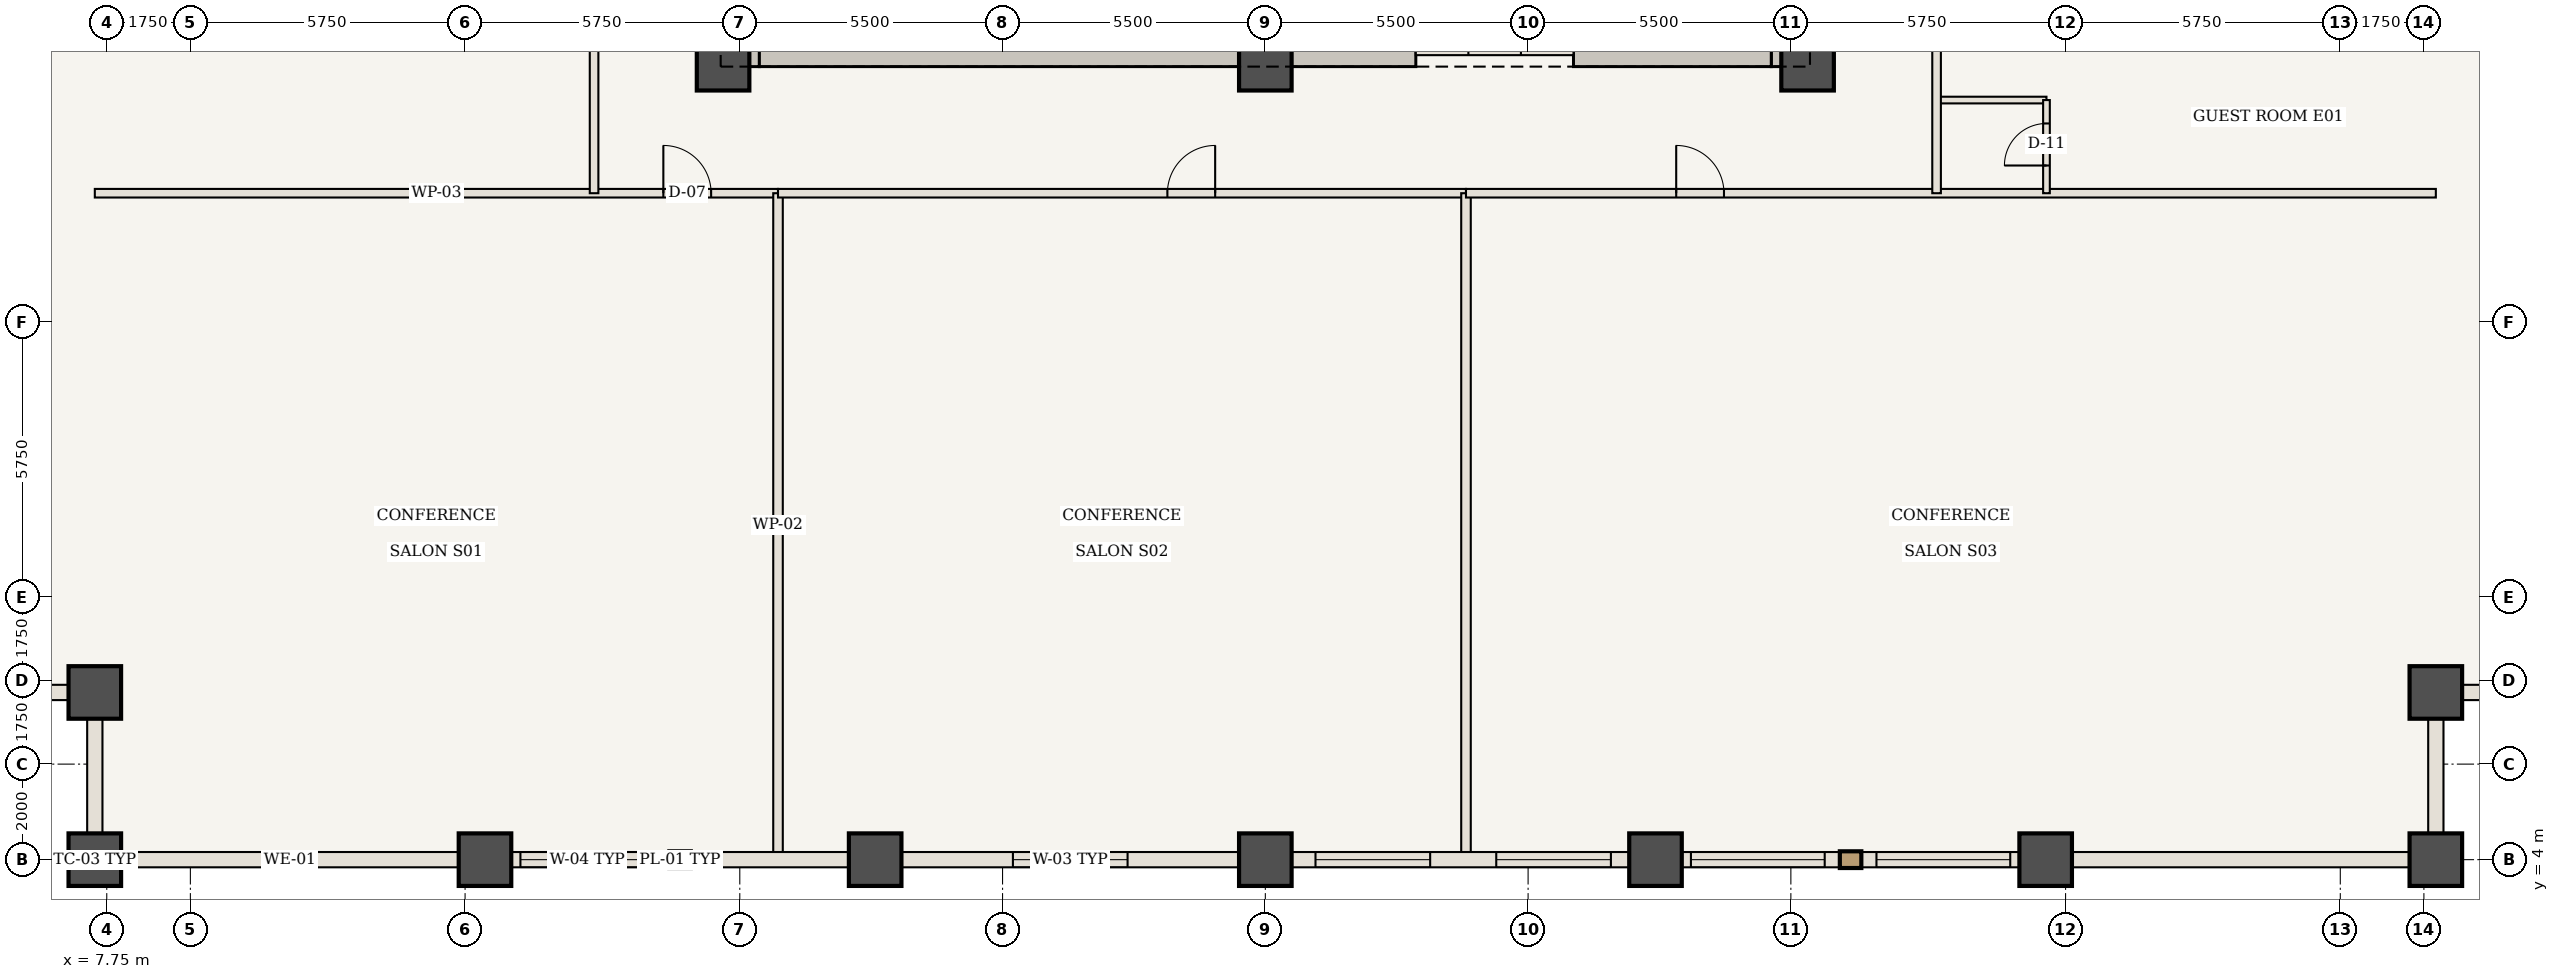
"""IFC4 building model, lengths in metres.
Left out: names, types, materials, properties, quantities, classifications, styles, units other than length and angle.
Written with IfcOpenShell. Run it as: python <this file> out.ifc"""

import sys

from ifc_helpers import new_model, si_unit, direction, frame, frame_2d, origin, origin_2d, place, context, subcontext, project, spatial, rectangle, extrude, element, fill, save


model = new_model("IFC4")
c1 = context("Model", 3, precision=1e-05, world=origin(), true_north=direction((0.0, 1.0)))
c2 = subcontext(c1, "Body", "Model", "MODEL_VIEW")
j1 = project(units=[si_unit("LENGTHUNIT", "METRE"), si_unit("PLANEANGLEUNIT", "RADIAN")], contexts=[c1])
p1 = place(None, origin())
s1 = spatial("IfcSite", under=j1, at=p1, CompositionType="ELEMENT")
p2 = place(p1, origin())
s2 = spatial("IfcBuilding", under=s1, at=p2, CompositionType="ELEMENT")
p3 = place(p2, frame((0.0, 0.0, 73.85)))
s3 = spatial("IfcBuildingStorey", under=s2, at=p3, CompositionType="ELEMENT", Elevation=73.85)
p4 = place(p3, frame((21.06, 20.6, 0.0), z_axis=(0.0, 0.0, 1.0), x_axis=(0.0, 1.0, 0.0)))
e1 = element("IfcWall", 1, at=p4, inside=s3, PredefinedType="SHEAR", context=c2, shape_type="SweptSolid", body=[
    extrude(rectangle(XDim=10.0, YDim=0.7, at=frame_2d((5.0, 0.0))), origin(), (0.0, 0.0, 1.0), 3.5),
])
p5 = place(p4, frame((1.15, 0.0, 0.0)))
e2 = element("IfcOpeningElement", 2, at=p5, cuts=e1, PredefinedType="OPENING", context=c2, shape_type="SweptSolid", body=[
    extrude(rectangle(XDim=1.15, YDim=2.15, at=frame_2d((0.575, 1.075))), frame((0.0, 0.36, 0.0), z_axis=(0.0, -1.0, 0.0), x_axis=(1.0, 0.0, 0.0)), (0.0, 0.0, 1.0), 0.72),
])
p6 = place(p3, frame((42.94, 20.6, 0.0), z_axis=(0.0, 0.0, 1.0), x_axis=(0.0, 1.0, 0.0)))
e3 = element("IfcWall", 3, at=p6, inside=s3, PredefinedType="SHEAR", context=c2, shape_type="SweptSolid", body=[
    extrude(rectangle(XDim=10.0, YDim=0.7, at=frame_2d((5.0, 0.0))), origin(), (0.0, 0.0, 1.0), 3.5),
])
p7 = place(p6, frame((1.15, 0.0, 0.0)))
e4 = element("IfcOpeningElement", 4, at=p7, cuts=e3, PredefinedType="OPENING", context=c2, shape_type="SweptSolid", body=[
    extrude(rectangle(XDim=1.15, YDim=2.15, at=frame_2d((0.575, 1.075))), frame((0.0, 0.36, 0.0), z_axis=(0.0, -1.0, 0.0), x_axis=(1.0, 0.0, 0.0)), (0.0, 0.0, 1.0), 0.72),
])
p8 = place(p3, frame((21.41, 20.95, 0.0), z_axis=(0.0, 0.0, 1.0), x_axis=(1.0, 0.0, 0.0)))
e5 = element("IfcWall", 5, at=p8, inside=s3, PredefinedType="SHEAR", context=c2, shape_type="SweptSolid", body=[
    extrude(rectangle(XDim=13.74, YDim=0.7, at=frame_2d((6.87, 0.0))), origin(), (0.0, 0.0, 1.0), 3.5),
])
p9 = place(p3, frame((38.45, 20.95, 0.0), z_axis=(0.0, 0.0, 1.0), x_axis=(1.0, 0.0, 0.0)))
e6 = element("IfcWall", 6, at=p9, inside=s3, PredefinedType="SHEAR", context=c2, shape_type="SweptSolid", body=[
    extrude(rectangle(XDim=4.14, YDim=0.7, at=frame_2d((2.07, 0.0))), origin(), (0.0, 0.0, 1.0), 3.5),
])
for number, where, z_axis, x_axis in (
    (7, (20.65, 20.65, 0.0), (0.0, 0.0, 1.0), (1.0, 0.0, 0.0)),
    (8, (32.0, 20.65, 0.0), (0.0, 0.0, 1.0), (1.0, 0.0, 0.0)),
    (9, (43.35, 20.65, 0.0), (0.0, 0.0, 1.0), (1.0, 0.0, 0.0)),
    (10, (7.5, 4.0, 0.0), (0.0, 0.0, 1.0), (1.0, 0.0, 0.0)),
    (11, (7.5, 7.5, 0.0), (0.0, 0.0, 1.0), (1.0, 0.0, 0.0)),
    (12, (56.5, 4.0, 0.0), (0.0, 0.0, 1.0), (1.0, 0.0, 0.0)),
    (13, (56.5, 7.5, 0.0), (0.0, 0.0, 1.0), (1.0, 0.0, 0.0)),
    (14, (15.667, 4.0, 0.0), (0.0, 0.0, 1.0), (1.0, 0.0, 0.0)),
    (15, (23.833, 4.0, 0.0), (0.0, 0.0, 1.0), (1.0, 0.0, 0.0)),
    (16, (32.0, 4.0, 0.0), (0.0, 0.0, 1.0), (1.0, 0.0, 0.0)),
    (17, (40.167, 4.0, 0.0), (0.0, 0.0, 1.0), (1.0, 0.0, 0.0)),
    (18, (48.333, 4.0, 0.0), (0.0, 0.0, 1.0), (1.0, 0.0, 0.0)),
):
    element("IfcColumn", number, at=place(p3, frame(where, z_axis=z_axis, x_axis=x_axis)), inside=s3, PredefinedType="COLUMN", context=c2, shape_type="SweptSolid", body=[
        extrude(rectangle(XDim=1.1, YDim=1.1, at=origin_2d()), origin(), (0.0, 0.0, 1.0), 3.5),
    ])
p10 = place(p3, frame((35.15, 20.95, 0.0), z_axis=(0.0, 0.0, 1.0), x_axis=(1.0, 0.0, 0.0)))
e19 = element("IfcWall", 19, at=p10, inside=s3, PredefinedType="STANDARD", context=c2, shape_type="SweptSolid", body=[
    extrude(rectangle(XDim=3.3, YDim=0.22, at=frame_2d((1.65, 0.0))), origin(), (0.0, 0.0, 1.0), 3.24),
])
p11 = place(p10, frame((1.1, 0.0, 0.0)))
e20 = element("IfcOpeningElement", 20, at=p11, cuts=e19, PredefinedType="OPENING", context=c2, shape_type="SweptSolid", body=[
    extrude(rectangle(XDim=1.1, YDim=2.15, at=frame_2d((0.55, 1.075))), frame((0.0, 0.12, 0.0), z_axis=(0.0, -1.0, 0.0), x_axis=(1.0, 0.0, 0.0)), (0.0, 0.0, 1.0), 0.24),
])
p12 = place(p3, frame((7.5, 17.95, 0.0), z_axis=(0.0, 0.0, 1.0), x_axis=(1.0, 0.0, 0.0)))
e21 = element("IfcWall", 21, at=p12, inside=s3, PredefinedType="STANDARD", context=c2, shape_type="SweptSolid", body=[
    extrude(rectangle(XDim=14.3, YDim=0.18, at=frame_2d((7.15, 0.0))), origin(), (0.0, 0.0, 1.0), 3.24),
])
p13 = place(p12, frame((11.9, 0.0, 0.0)))
e22 = element("IfcOpeningElement", 22, at=p13, cuts=e21, PredefinedType="OPENING", context=c2, shape_type="SweptSolid", body=[
    extrude(rectangle(XDim=1.0, YDim=2.15, at=frame_2d((0.5, 1.075))), frame((0.0, 0.1, 0.0), z_axis=(0.0, -1.0, 0.0), x_axis=(1.0, 0.0, 0.0)), (0.0, 0.0, 1.0), 0.2),
])
p14 = place(p3, frame((21.8, 4.06, 0.0), z_axis=(0.0, 0.0, 1.0), x_axis=(0.0, 1.0, 0.0)))
e23 = element("IfcWall", 23, at=p14, inside=s3, PredefinedType="STANDARD", context=c2, shape_type="SweptSolid", body=[
    extrude(rectangle(XDim=13.89, YDim=0.2, at=frame_2d((6.945, 0.0))), origin(), (0.0, 0.0, 1.0), 3.24),
])
p15 = place(p3, frame((21.8, 17.95, 0.0), z_axis=(0.0, 0.0, 1.0), x_axis=(1.0, 0.0, 0.0)))
e24 = element("IfcWall", 24, at=p15, inside=s3, PredefinedType="STANDARD", context=c2, shape_type="SweptSolid", body=[
    extrude(rectangle(XDim=14.4, YDim=0.18, at=frame_2d((7.2, 0.0))), origin(), (0.0, 0.0, 1.0), 3.24),
])
p16 = place(p15, frame((8.15, 0.0, 0.0)))
e25 = element("IfcOpeningElement", 25, at=p16, cuts=e24, PredefinedType="OPENING", context=c2, shape_type="SweptSolid", body=[
    extrude(rectangle(XDim=1.0, YDim=2.15, at=frame_2d((0.5, 1.075))), frame((0.0, 0.1, 0.0), z_axis=(0.0, -1.0, 0.0), x_axis=(1.0, 0.0, 0.0)), (0.0, 0.0, 1.0), 0.2),
])
p17 = place(p3, frame((36.2, 4.06, 0.0), z_axis=(0.0, 0.0, 1.0), x_axis=(0.0, 1.0, 0.0)))
e26 = element("IfcWall", 26, at=p17, inside=s3, PredefinedType="STANDARD", context=c2, shape_type="SweptSolid", body=[
    extrude(rectangle(XDim=13.89, YDim=0.2, at=frame_2d((6.945, 0.0))), origin(), (0.0, 0.0, 1.0), 3.24),
])
p18 = place(p3, frame((36.2, 17.95, 0.0), z_axis=(0.0, 0.0, 1.0), x_axis=(1.0, 0.0, 0.0)))
e27 = element("IfcWall", 27, at=p18, inside=s3, PredefinedType="STANDARD", context=c2, shape_type="SweptSolid", body=[
    extrude(rectangle(XDim=20.3, YDim=0.18, at=frame_2d((10.15, 0.0))), origin(), (0.0, 0.0, 1.0), 3.24),
])
p19 = place(p18, frame((4.4, 0.0, 0.0)))
e28 = element("IfcOpeningElement", 28, at=p19, cuts=e27, PredefinedType="OPENING", context=c2, shape_type="SweptSolid", body=[
    extrude(rectangle(XDim=1.0, YDim=2.15, at=frame_2d((0.5, 1.075))), frame((0.0, 0.1, 0.0), z_axis=(0.0, -1.0, 0.0), x_axis=(1.0, 0.0, 0.0)), (0.0, 0.0, 1.0), 0.2),
])
p20 = place(p3, frame((17.95, 17.95, 0.0), z_axis=(0.0, 0.0, 1.0), x_axis=(0.0, 1.0, 0.0)))
e29 = element("IfcWall", 29, at=p20, inside=s3, PredefinedType="STANDARD", context=c2, shape_type="SweptSolid", body=[
    extrude(rectangle(XDim=15.55, YDim=0.18, at=frame_2d((7.775, 0.0))), origin(), (0.0, 0.0, 1.0), 3.24),
])
p21 = place(p20, frame((7.275, 0.0, 0.0)))
e30 = element("IfcOpeningElement", 30, at=p21, cuts=e29, PredefinedType="OPENING", context=c2, shape_type="SweptSolid", body=[
    extrude(rectangle(XDim=1.0, YDim=2.15, at=frame_2d((0.5, 1.075))), frame((0.0, 0.1, 0.0), z_axis=(0.0, -1.0, 0.0), x_axis=(1.0, 0.0, 0.0)), (0.0, 0.0, 1.0), 0.2),
])
p22 = place(p3, frame((46.05, 19.9, 0.0), z_axis=(0.0, 0.0, 1.0), x_axis=(1.0, 0.0, 0.0)))
e31 = element("IfcWall", 31, at=p22, inside=s3, PredefinedType="STANDARD", context=c2, shape_type="SweptSolid", body=[
    extrude(rectangle(XDim=2.3, YDim=0.14, at=frame_2d((1.15, 0.0))), origin(), (0.0, 0.0, 1.0), 3.24),
])
p23 = place(p3, frame((48.35, 17.95, 0.0), z_axis=(0.0, 0.0, 1.0), x_axis=(0.0, 1.0, 0.0)))
e32 = element("IfcWall", 32, at=p23, inside=s3, PredefinedType="STANDARD", context=c2, shape_type="SweptSolid", body=[
    extrude(rectangle(XDim=1.95, YDim=0.14, at=frame_2d((0.975, 0.0))), origin(), (0.0, 0.0, 1.0), 3.24),
])
p24 = place(p23, frame((0.58, 0.0, 0.0)))
e33 = element("IfcOpeningElement", 33, at=p24, cuts=e32, PredefinedType="OPENING", context=c2, shape_type="SweptSolid", body=[
    extrude(rectangle(XDim=0.88, YDim=2.1, at=frame_2d((0.44, 1.05))), frame((0.0, 0.08, 0.0), z_axis=(0.0, -1.0, 0.0), x_axis=(1.0, 0.0, 0.0)), (0.0, 0.0, 1.0), 0.16),
])
p25 = place(p3, frame((46.05, 17.95, 0.0), z_axis=(0.0, 0.0, 1.0), x_axis=(0.0, 1.0, 0.0)))
e34 = element("IfcWall", 34, at=p25, inside=s3, PredefinedType="STANDARD", context=c2, shape_type="SweptSolid", body=[
    extrude(rectangle(XDim=5.15, YDim=0.18, at=frame_2d((2.575, 0.0))), origin(), (0.0, 0.0, 1.0), 3.24),
])
p26 = place(p25, frame((3.0, 0.0, 0.0)))
e35 = element("IfcOpeningElement", 35, at=p26, cuts=e34, PredefinedType="OPENING", context=c2, shape_type="SweptSolid", body=[
    extrude(rectangle(XDim=1.0, YDim=2.15, at=frame_2d((0.5, 1.075))), frame((0.0, 0.1, 0.0), z_axis=(0.0, -1.0, 0.0), x_axis=(1.0, 0.0, 0.0)), (0.0, 0.0, 1.0), 0.2),
])
p27 = place(p3, frame((15.667, 4.0, 0.0), z_axis=(0.0, 0.0, 1.0), x_axis=(-1.0, 0.0, 0.0)))
e36 = element("IfcWall", 36, at=p27, inside=s3, PredefinedType="USERDEFINED", context=c2, shape_type="SweptSolid", body=[
    extrude(rectangle(XDim=8.167, YDim=0.32, at=frame_2d((4.083, 0.0))), origin(), (0.0, 0.0, 1.0), 2.44),
])
p28 = place(p3, frame((23.833, 4.0, 0.0), z_axis=(0.0, 0.0, 1.0), x_axis=(-1.0, 0.0, 0.0)))
e37 = element("IfcWall", 37, at=p28, inside=s3, PredefinedType="USERDEFINED", context=c2, shape_type="SweptSolid", body=[
    extrude(rectangle(XDim=8.167, YDim=0.32, at=frame_2d((4.083, 0.0))), origin(), (0.0, 0.0, 1.0), 2.44),
])
p29 = place(p28, frame((4.625, 0.0, 0.85)))
e38 = element("IfcOpeningElement", 38, at=p29, cuts=e37, PredefinedType="OPENING", context=c2, shape_type="SweptSolid", body=[
    extrude(rectangle(XDim=2.8, YDim=1.39, at=frame_2d((1.4, 0.695))), frame((0.0, 0.17, 0.0), z_axis=(0.0, -1.0, 0.0), x_axis=(1.0, 0.0, 0.0)), (0.0, 0.0, 1.0), 0.34),
])
p30 = place(p3, frame((32.0, 4.0, 0.0), z_axis=(0.0, 0.0, 1.0), x_axis=(-1.0, 0.0, 0.0)))
e39 = element("IfcWall", 39, at=p30, inside=s3, PredefinedType="USERDEFINED", context=c2, shape_type="SweptSolid", body=[
    extrude(rectangle(XDim=8.167, YDim=0.32, at=frame_2d((4.083, 0.0))), origin(), (0.0, 0.0, 1.0), 2.44),
])
p31 = place(p30, frame((2.883, 0.0, 0.85)))
e40 = element("IfcOpeningElement", 40, at=p31, cuts=e39, PredefinedType="OPENING", context=c2, shape_type="SweptSolid", body=[
    extrude(rectangle(XDim=2.4, YDim=1.39, at=frame_2d((1.2, 0.695))), frame((0.0, 0.17, 0.0), z_axis=(0.0, -1.0, 0.0), x_axis=(1.0, 0.0, 0.0)), (0.0, 0.0, 1.0), 0.34),
])
p32 = place(p3, frame((40.167, 4.0, 0.0), z_axis=(0.0, 0.0, 1.0), x_axis=(-1.0, 0.0, 0.0)))
e41 = element("IfcWall", 41, at=p32, inside=s3, PredefinedType="USERDEFINED", context=c2, shape_type="SweptSolid", body=[
    extrude(rectangle(XDim=8.167, YDim=0.32, at=frame_2d((4.083, 0.0))), origin(), (0.0, 0.0, 1.0), 2.44),
])
p33 = place(p32, frame((0.933, 0.0, 0.85)))
e42 = element("IfcOpeningElement", 42, at=p33, cuts=e41, PredefinedType="OPENING", context=c2, shape_type="SweptSolid", body=[
    extrude(rectangle(XDim=2.4, YDim=1.39, at=frame_2d((1.2, 0.695))), frame((0.0, 0.17, 0.0), z_axis=(0.0, -1.0, 0.0), x_axis=(1.0, 0.0, 0.0)), (0.0, 0.0, 1.0), 0.34),
])
p34 = place(p32, frame((4.717, 0.0, 0.85)))
e43 = element("IfcOpeningElement", 43, at=p34, cuts=e41, PredefinedType="OPENING", context=c2, shape_type="SweptSolid", body=[
    extrude(rectangle(XDim=2.4, YDim=1.39, at=frame_2d((1.2, 0.695))), frame((0.0, 0.17, 0.0), z_axis=(0.0, -1.0, 0.0), x_axis=(1.0, 0.0, 0.0)), (0.0, 0.0, 1.0), 0.34),
])
p35 = place(p3, frame((48.333, 4.0, 0.0), z_axis=(0.0, 0.0, 1.0), x_axis=(-1.0, 0.0, 0.0)))
e44 = element("IfcWall", 44, at=p35, inside=s3, PredefinedType="USERDEFINED", context=c2, shape_type="SweptSolid", body=[
    extrude(rectangle(XDim=8.167, YDim=0.32, at=frame_2d((4.083, 0.0))), origin(), (0.0, 0.0, 1.0), 2.44),
])
p36 = place(p35, frame((0.742, 0.0, 0.85)))
e45 = element("IfcOpeningElement", 45, at=p36, cuts=e44, PredefinedType="OPENING", context=c2, shape_type="SweptSolid", body=[
    extrude(rectangle(XDim=2.8, YDim=1.39, at=frame_2d((1.4, 0.695))), frame((0.0, 0.17, 0.0), z_axis=(0.0, -1.0, 0.0), x_axis=(1.0, 0.0, 0.0)), (0.0, 0.0, 1.0), 0.34),
])
p37 = place(p35, frame((4.625, 0.0, 0.85)))
e46 = element("IfcOpeningElement", 46, at=p37, cuts=e44, PredefinedType="OPENING", context=c2, shape_type="SweptSolid", body=[
    extrude(rectangle(XDim=2.8, YDim=1.39, at=frame_2d((1.4, 0.695))), frame((0.0, 0.17, 0.0), z_axis=(0.0, -1.0, 0.0), x_axis=(1.0, 0.0, 0.0)), (0.0, 0.0, 1.0), 0.34),
])
p38 = place(p3, frame((56.5, 4.0, 0.0), z_axis=(0.0, 0.0, 1.0), x_axis=(-1.0, 0.0, 0.0)))
e47 = element("IfcWall", 47, at=p38, inside=s3, PredefinedType="USERDEFINED", context=c2, shape_type="SweptSolid", body=[
    extrude(rectangle(XDim=8.167, YDim=0.32, at=frame_2d((4.083, 0.0))), origin(), (0.0, 0.0, 1.0), 2.44),
])
for number, where, z_axis, x_axis in (
    (48, (7.5, 4.0, 0.0), (0.0, 0.0, 1.0), (0.0, 1.0, 0.0)),
    (49, (7.5, 7.5, 0.0), (0.0, 0.0, 1.0), (-1.0, 0.0, 0.0)),
    (50, (56.5, 7.5, 0.0), (0.0, 0.0, 1.0), (0.0, -1.0, 0.0)),
    (51, (60.0, 7.5, 0.0), (0.0, 0.0, 1.0), (-1.0, 0.0, 0.0)),
):
    element("IfcWall", number, at=place(p3, frame(where, z_axis=z_axis, x_axis=x_axis)), inside=s3, PredefinedType="USERDEFINED", context=c2, shape_type="SweptSolid", body=[
        extrude(rectangle(XDim=3.5, YDim=0.32, at=frame_2d((1.75, 0.0))), origin(), (0.0, 0.0, 1.0), 2.44),
    ])
p39 = place(p13, origin())
e52 = element("IfcDoor", 52, at=p39, inside=s3, OperationType="SINGLE_SWING_LEFT", PredefinedType="DOOR", context=c2, shape_type="SweptSolid", body=[
    extrude(rectangle(XDim=1.0, YDim=2.15, at=frame_2d((0.5, 1.075))), frame((0.0, 0.025, 0.0), z_axis=(0.0, -1.0, 0.0), x_axis=(1.0, 0.0, 0.0)), (0.0, 0.0, 1.0), 0.05),
])
fill(e22, e52)
p40 = place(p16, origin())
e53 = element("IfcDoor", 53, at=p40, inside=s3, OperationType="SINGLE_SWING_RIGHT", PredefinedType="DOOR", context=c2, shape_type="SweptSolid", body=[
    extrude(rectangle(XDim=1.0, YDim=2.15, at=frame_2d((0.5, 1.075))), frame((0.0, 0.025, 0.0), z_axis=(0.0, -1.0, 0.0), x_axis=(1.0, 0.0, 0.0)), (0.0, 0.0, 1.0), 0.05),
])
fill(e25, e53)
p41 = place(p19, origin())
e54 = element("IfcDoor", 54, at=p41, inside=s3, OperationType="SINGLE_SWING_LEFT", PredefinedType="DOOR", context=c2, shape_type="SweptSolid", body=[
    extrude(rectangle(XDim=1.0, YDim=2.15, at=frame_2d((0.5, 1.075))), frame((0.0, 0.025, 0.0), z_axis=(0.0, -1.0, 0.0), x_axis=(1.0, 0.0, 0.0)), (0.0, 0.0, 1.0), 0.05),
])
fill(e28, e54)
p42 = place(p24, origin())
e55 = element("IfcDoor", 55, at=p42, inside=s3, OperationType="SINGLE_SWING_LEFT", PredefinedType="DOOR", context=c2, shape_type="SweptSolid", body=[
    extrude(rectangle(XDim=0.88, YDim=2.1, at=frame_2d((0.44, 1.05))), frame((0.0, 0.025, 0.0), z_axis=(0.0, -1.0, 0.0), x_axis=(1.0, 0.0, 0.0)), (0.0, 0.0, 1.0), 0.05),
])
fill(e33, e55)
p43 = place(p29, origin())
e56 = element("IfcWindow", 56, at=p43, inside=s3, PartitioningType="SINGLE_PANEL", PredefinedType="WINDOW", context=c2, shape_type="SweptSolid", body=[
    extrude(rectangle(XDim=2.8, YDim=1.39, at=frame_2d((1.4, 0.695))), frame((0.0, 0.03, 0.0), z_axis=(0.0, -1.0, 0.0), x_axis=(1.0, 0.0, 0.0)), (0.0, 0.0, 1.0), 0.06),
])
fill(e38, e56)
p44 = place(p31, origin())
e57 = element("IfcWindow", 57, at=p44, inside=s3, PartitioningType="SINGLE_PANEL", PredefinedType="WINDOW", context=c2, shape_type="SweptSolid", body=[
    extrude(rectangle(XDim=2.4, YDim=1.39, at=frame_2d((1.2, 0.695))), frame((0.0, 0.03, 0.0), z_axis=(0.0, -1.0, 0.0), x_axis=(1.0, 0.0, 0.0)), (0.0, 0.0, 1.0), 0.06),
])
fill(e40, e57)
p45 = place(p33, origin())
e58 = element("IfcWindow", 58, at=p45, inside=s3, PartitioningType="SINGLE_PANEL", PredefinedType="WINDOW", context=c2, shape_type="SweptSolid", body=[
    extrude(rectangle(XDim=2.4, YDim=1.39, at=frame_2d((1.2, 0.695))), frame((0.0, 0.03, 0.0), z_axis=(0.0, -1.0, 0.0), x_axis=(1.0, 0.0, 0.0)), (0.0, 0.0, 1.0), 0.06),
])
fill(e42, e58)
p46 = place(p34, origin())
e59 = element("IfcWindow", 59, at=p46, inside=s3, PartitioningType="SINGLE_PANEL", PredefinedType="WINDOW", context=c2, shape_type="SweptSolid", body=[
    extrude(rectangle(XDim=2.4, YDim=1.39, at=frame_2d((1.2, 0.695))), frame((0.0, 0.03, 0.0), z_axis=(0.0, -1.0, 0.0), x_axis=(1.0, 0.0, 0.0)), (0.0, 0.0, 1.0), 0.06),
])
fill(e43, e59)
p47 = place(p36, origin())
e60 = element("IfcWindow", 60, at=p47, inside=s3, PartitioningType="SINGLE_PANEL", PredefinedType="WINDOW", context=c2, shape_type="SweptSolid", body=[
    extrude(rectangle(XDim=2.8, YDim=1.39, at=frame_2d((1.4, 0.695))), frame((0.0, 0.03, 0.0), z_axis=(0.0, -1.0, 0.0), x_axis=(1.0, 0.0, 0.0)), (0.0, 0.0, 1.0), 0.06),
])
fill(e45, e60)
p48 = place(p37, origin())
e61 = element("IfcWindow", 61, at=p48, inside=s3, PartitioningType="SINGLE_PANEL", PredefinedType="WINDOW", context=c2, shape_type="SweptSolid", body=[
    extrude(rectangle(XDim=2.8, YDim=1.39, at=frame_2d((1.4, 0.695))), frame((0.0, 0.03, 0.0), z_axis=(0.0, -1.0, 0.0), x_axis=(1.0, 0.0, 0.0)), (0.0, 0.0, 1.0), 0.06),
])
fill(e46, e61)
save(model, sys.argv[1])
